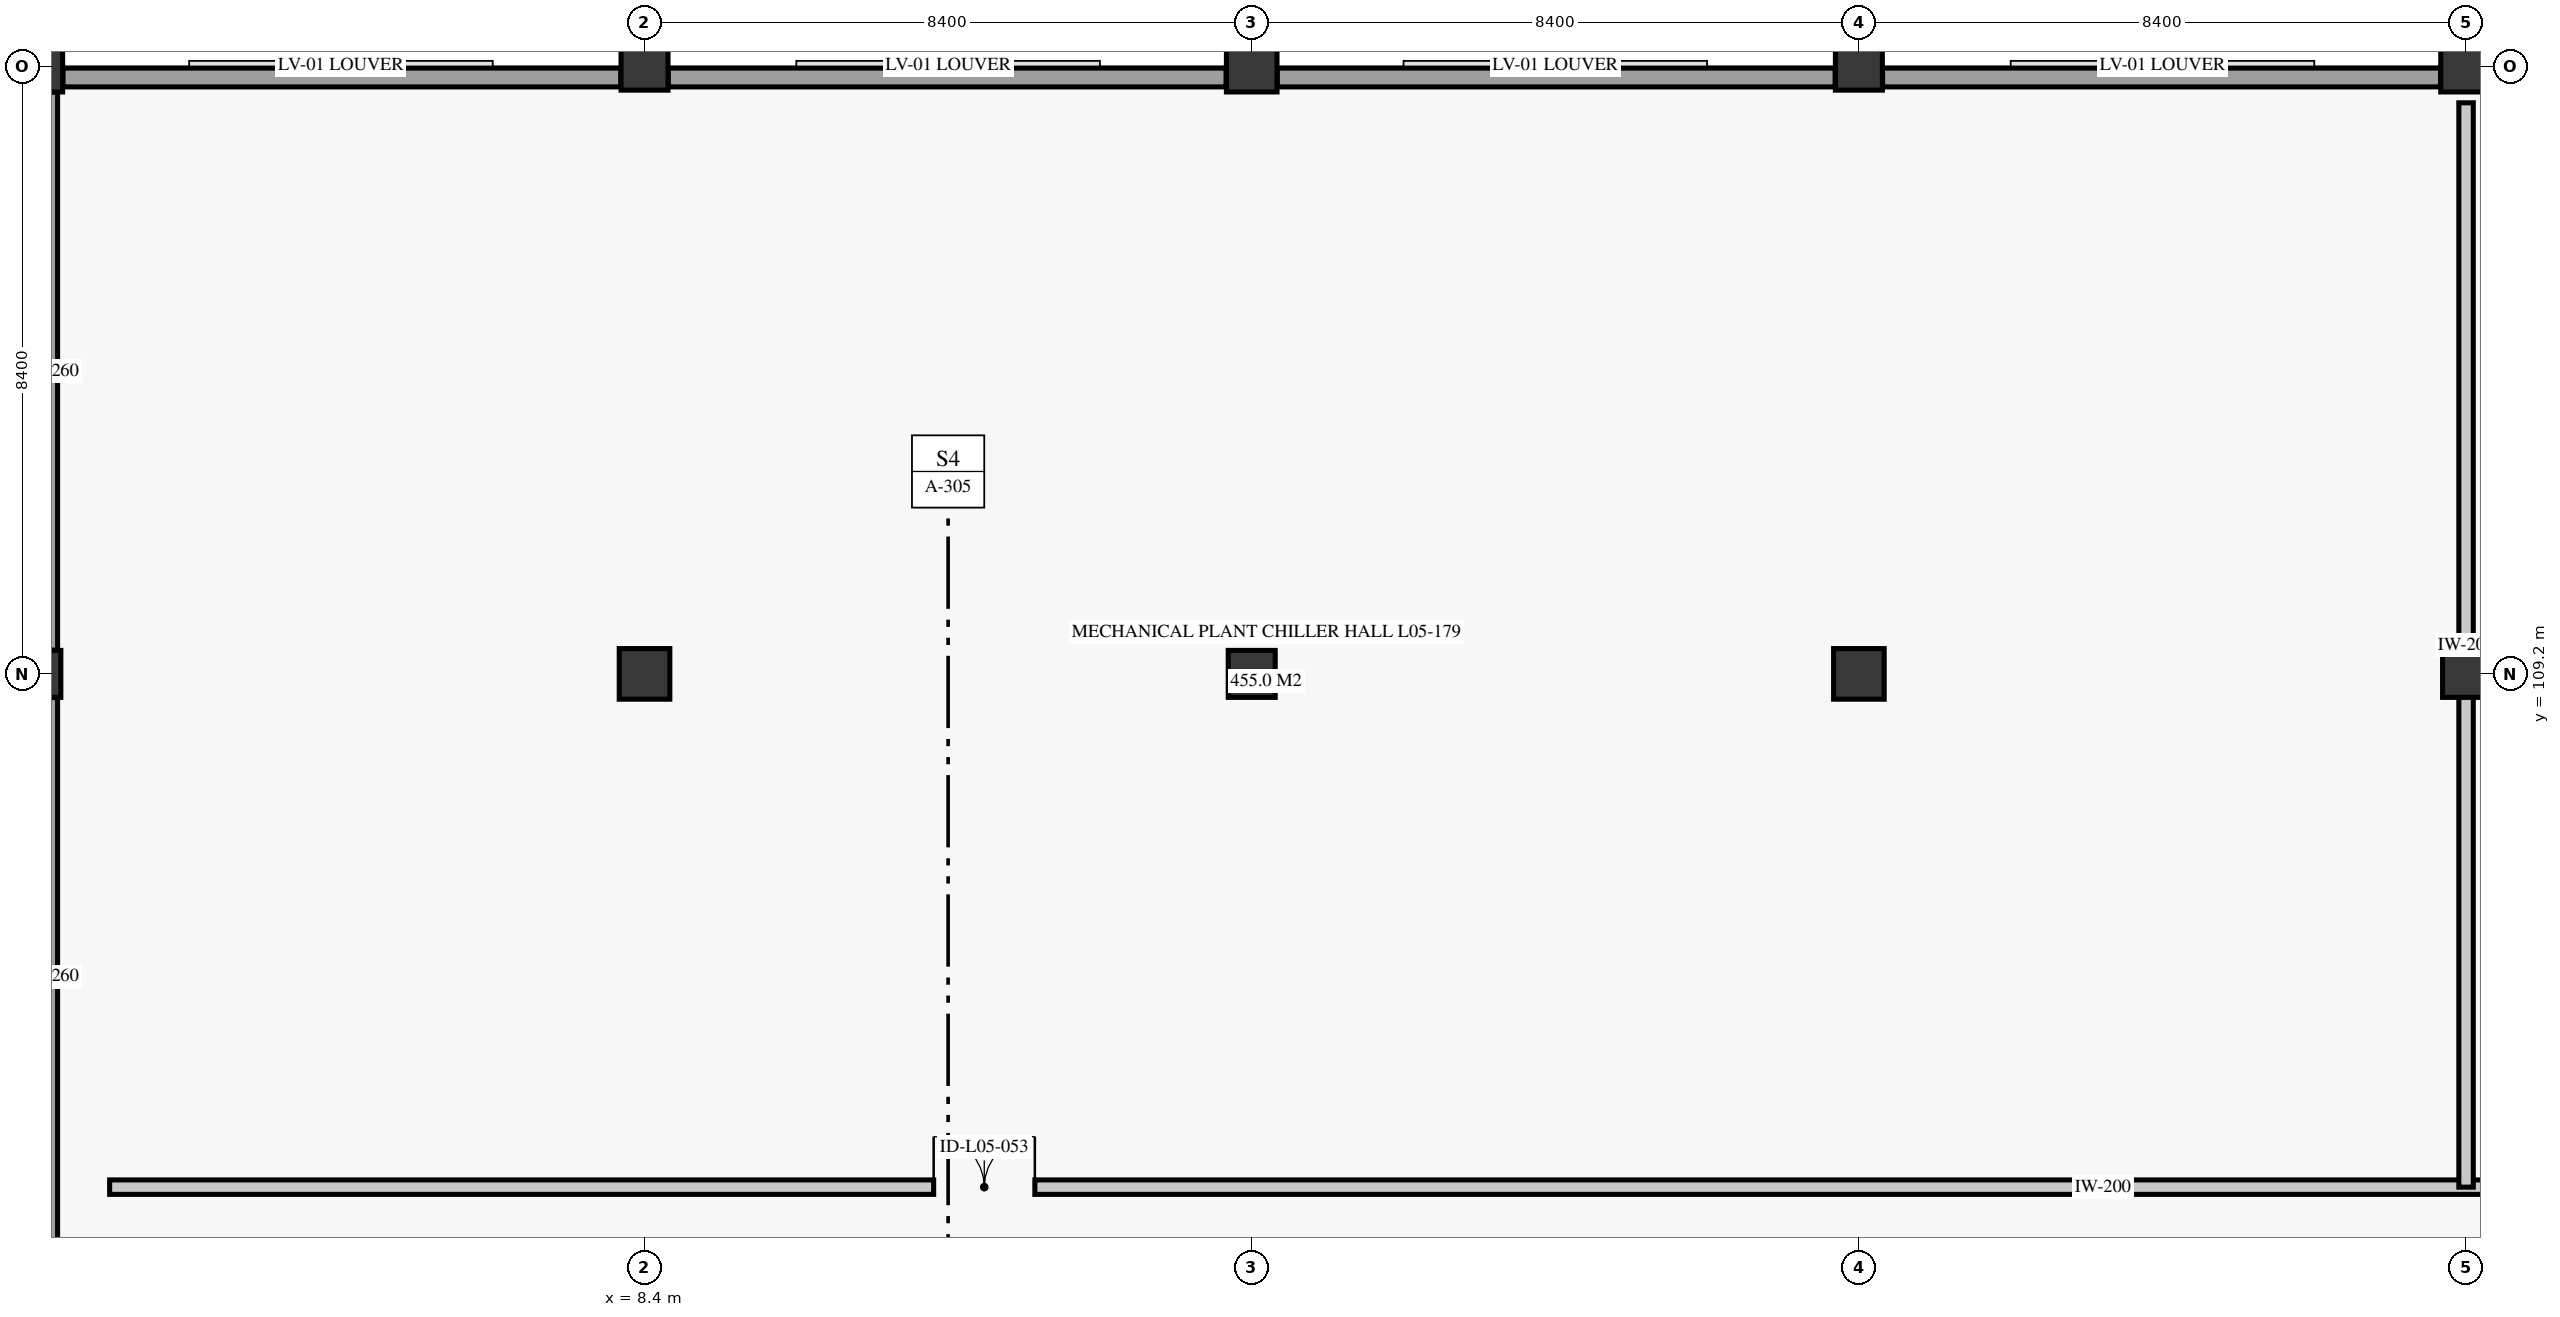
"""IFC4 building model, lengths in metres.
Left out: names, types, materials, properties, quantities, classifications, styles, units other than length and angle.
Written with IfcOpenShell. Run it as: python <this file> out.ifc"""

import sys

from ifc_helpers import new_model, si_unit, direction, frame, frame_2d, origin, origin_2d, place, context, subcontext, project, spatial, rectangle, extrude, element, fill, save


model = new_model("IFC4")
c1 = context("Model", 3, precision=1e-05, world=origin(), true_north=direction((0.0, 1.0)))
c2 = subcontext(c1, "Body", "Model", "MODEL_VIEW")
j1 = project(units=[si_unit("LENGTHUNIT", "METRE"), si_unit("PLANEANGLEUNIT", "RADIAN")], contexts=[c1])
p1 = place(None, origin())
s1 = spatial("IfcSite", under=j1, at=p1, CompositionType="ELEMENT")
p2 = place(p1, origin())
s2 = spatial("IfcBuilding", under=s1, at=p2, CompositionType="ELEMENT")
p3 = place(p2, frame((0.0, 0.0, 22.2)))
s3 = spatial("IfcBuildingStorey", under=s2, at=p3, CompositionType="ELEMENT", Elevation=22.2)
p4 = place(p3, frame((0.0, 109.2, 0.0), z_axis=(0.0, 0.0, 1.0), x_axis=(1.0, 0.0, 0.0)))
e1 = element("IfcColumn", 1, at=p4, inside=s3, PredefinedType="COLUMN", context=c2, shape_type="SweptSolid", body=[
    extrude(rectangle(XDim=0.65, YDim=0.65, at=origin_2d()), origin(), (0.0, 0.0, 1.0), 4.22),
])
for number, where, z_axis, x_axis in (
    (2, (0.0, 117.6, 0.0), (0.0, 0.0, 1.0), (1.0, 0.0, 0.0)),
    (3, (8.4, 109.2, 0.0), (0.0, 0.0, 1.0), (1.0, 0.0, 0.0)),
):
    element("IfcColumn", number, at=place(p3, frame(where, z_axis=z_axis, x_axis=x_axis)), inside=s3, PredefinedType="COLUMN", context=c2, shape_type="SweptSolid", body=[
        extrude(rectangle(XDim=0.7, YDim=0.7, at=origin_2d()), origin(), (0.0, 0.0, 1.0), 4.22),
    ])
for number, where, z_axis, x_axis in (
    (4, (8.4, 117.6, 0.0), (0.0, 0.0, 1.0), (1.0, 0.0, 0.0)),
    (5, (16.8, 109.2, 0.0), (0.0, 0.0, 1.0), (1.0, 0.0, 0.0)),
):
    element("IfcColumn", number, at=place(p3, frame(where, z_axis=z_axis, x_axis=x_axis)), inside=s3, PredefinedType="COLUMN", context=c2, shape_type="SweptSolid", body=[
        extrude(rectangle(XDim=0.65, YDim=0.65, at=origin_2d()), origin(), (0.0, 0.0, 1.0), 4.22),
    ])
for number, where, z_axis, x_axis in (
    (6, (16.8, 117.6, 0.0), (0.0, 0.0, 1.0), (1.0, 0.0, 0.0)),
    (7, (25.2, 109.2, 0.0), (0.0, 0.0, 1.0), (1.0, 0.0, 0.0)),
):
    element("IfcColumn", number, at=place(p3, frame(where, z_axis=z_axis, x_axis=x_axis)), inside=s3, PredefinedType="COLUMN", context=c2, shape_type="SweptSolid", body=[
        extrude(rectangle(XDim=0.7, YDim=0.7, at=origin_2d()), origin(), (0.0, 0.0, 1.0), 4.22),
    ])
for number, where, z_axis, x_axis in (
    (8, (25.2, 117.6, 0.0), (0.0, 0.0, 1.0), (1.0, 0.0, 0.0)),
    (9, (33.6, 109.2, 0.0), (0.0, 0.0, 1.0), (1.0, 0.0, 0.0)),
):
    element("IfcColumn", number, at=place(p3, frame(where, z_axis=z_axis, x_axis=x_axis)), inside=s3, PredefinedType="COLUMN", context=c2, shape_type="SweptSolid", body=[
        extrude(rectangle(XDim=0.65, YDim=0.65, at=origin_2d()), origin(), (0.0, 0.0, 1.0), 4.22),
    ])
p5 = place(p3, frame((33.6, 117.6, 0.0), z_axis=(0.0, 0.0, 1.0), x_axis=(1.0, 0.0, 0.0)))
e10 = element("IfcColumn", 10, at=p5, inside=s3, PredefinedType="COLUMN", context=c2, shape_type="SweptSolid", body=[
    extrude(rectangle(XDim=0.7, YDim=0.7, at=origin_2d()), origin(), (0.0, 0.0, 1.0), 4.22),
])
for number, where, z_axis, x_axis in (
    (11, (0.354, 117.45, 0.0), (0.0, 0.0, 1.0), (1.0, 0.0, 0.0)),
    (12, (8.728, 117.45, 0.0), (0.0, 0.0, 1.0), (1.0, 0.0, 0.0)),
    (13, (17.154, 117.45, 0.0), (0.0, 0.0, 1.0), (1.0, 0.0, 0.0)),
):
    element("IfcWall", number, at=place(p3, frame(where, z_axis=z_axis, x_axis=x_axis)), inside=s3, PredefinedType="SOLIDWALL", context=c2, shape_type="SweptSolid", body=[
        extrude(rectangle(XDim=7.718, YDim=0.26, at=frame_2d((3.859, 0.0))), origin(), (0.0, 0.0, 1.0), 3.37),
    ])
for number, where, z_axis, x_axis in (
    (14, (25.528, 117.45, 0.0), (0.0, 0.0, 1.0), (1.0, 0.0, 0.0)),
    (15, (0.15, 101.152, 0.0), (0.0, 0.0, 1.0), (0.0, 1.0, 0.0)),
):
    element("IfcWall", number, at=place(p3, frame(where, z_axis=z_axis, x_axis=x_axis)), inside=s3, PredefinedType="SOLIDWALL", context=c2, shape_type="SweptSolid", body=[
        extrude(rectangle(XDim=7.72, YDim=0.26, at=frame_2d((3.86, 0.0))), origin(), (0.0, 0.0, 1.0), 3.37),
    ])
p6 = place(p3, frame((0.15, 109.528, 0.0), z_axis=(0.0, 0.0, 1.0), x_axis=(0.0, 1.0, 0.0)))
e16 = element("IfcWall", 16, at=p6, inside=s3, PredefinedType="SOLIDWALL", context=c2, shape_type="SweptSolid", body=[
    extrude(rectangle(XDim=7.718, YDim=0.26, at=frame_2d((3.859, 0.0))), origin(), (0.0, 0.0, 1.0), 3.37),
])
p7 = place(p3, frame((1.0, 102.1, 0.0), z_axis=(0.0, 0.0, 1.0), x_axis=(1.0, 0.0, 0.0)))
e17 = element("IfcWall", 17, at=p7, inside=s3, PredefinedType="PARTITIONING", context=c2, shape_type="SweptSolid", body=[
    extrude(rectangle(XDim=65.6, YDim=0.2, at=frame_2d((32.8, 0.0))), origin(), (0.0, 0.0, 1.0), 3.84),
])
p8 = place(p7, frame((11.4, 0.0, 0.0)))
e18 = element("IfcOpeningElement", 18, at=p8, cuts=e17, PredefinedType="OPENING", context=c2, shape_type="SweptSolid", body=[
    extrude(rectangle(XDim=1.4, YDim=2.3, at=frame_2d((0.7, 1.15))), frame((0.0, 0.11, 0.0), z_axis=(0.0, -1.0, 0.0), x_axis=(1.0, 0.0, 0.0)), (0.0, 0.0, 1.0), 0.22),
])
p9 = place(p7, frame((45.2, 0.0, 0.0)))
e19 = element("IfcOpeningElement", 19, at=p9, cuts=e17, PredefinedType="OPENING", context=c2, shape_type="SweptSolid", body=[
    extrude(rectangle(XDim=1.4, YDim=2.3, at=frame_2d((0.7, 1.15))), frame((0.0, 0.11, 0.0), z_axis=(0.0, -1.0, 0.0), x_axis=(1.0, 0.0, 0.0)), (0.0, 0.0, 1.0), 0.22),
])
p10 = place(p3, frame((33.6, 102.1, 0.0), z_axis=(0.0, 0.0, 1.0), x_axis=(0.0, 1.0, 0.0)))
e20 = element("IfcWall", 20, at=p10, inside=s3, PredefinedType="PARTITIONING", context=c2, shape_type="SweptSolid", body=[
    extrude(rectangle(XDim=15.0, YDim=0.2, at=frame_2d((7.5, 0.0))), origin(), (0.0, 0.0, 1.0), 3.84),
])
p11 = place(p8, origin())
e21 = element("IfcDoor", 21, at=p11, inside=s3, OperationType="DOUBLE_DOOR_SINGLE_SWING", PredefinedType="DOOR", context=c2, shape_type="SweptSolid", body=[
    extrude(rectangle(XDim=1.4, YDim=2.3, at=frame_2d((0.7, 1.15))), frame((0.0, 0.025, 0.0), z_axis=(0.0, -1.0, 0.0), x_axis=(1.0, 0.0, 0.0)), (0.0, 0.0, 1.0), 0.05),
])
fill(e18, e21)
save(model, sys.argv[1])
